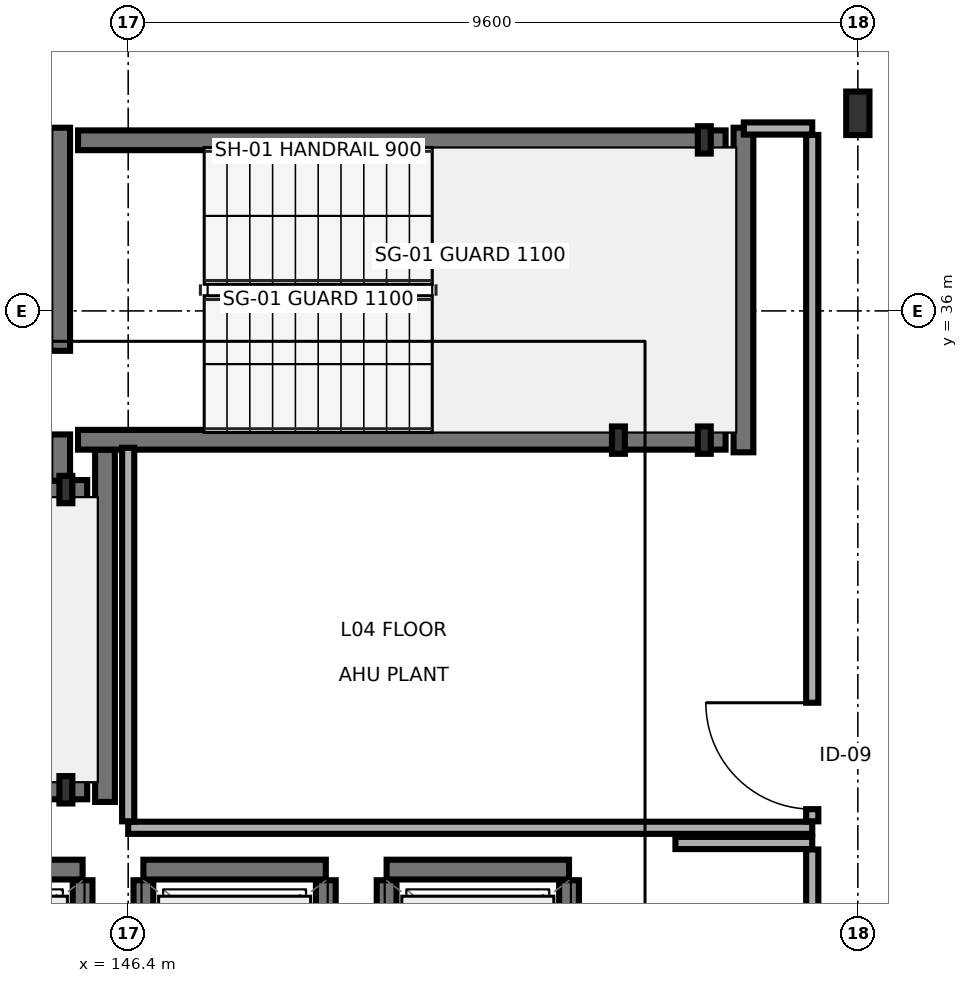
"""IFC4 building model, lengths in metres.
Left out: names, types, materials, properties, quantities, classifications, styles, units other than length and angle.
Written with IfcOpenShell. Run it as: python <this file> out.ifc"""

import sys

from ifc_helpers import new_model, si_unit, direction, frame, frame_2d, origin, origin_2d, place, context, subcontext, project, spatial, rectangle, i_section, extrude, element, fill, save


model = new_model("IFC4")
c1 = context("Model", 3, precision=1e-05, world=origin(), true_north=direction((0.0, 1.0)))
c2 = subcontext(c1, "Body", "Model", "MODEL_VIEW")
j1 = project(units=[si_unit("LENGTHUNIT", "METRE"), si_unit("PLANEANGLEUNIT", "RADIAN")], contexts=[c1])
p1 = place(None, origin())
s1 = spatial("IfcSite", under=j1, at=p1, CompositionType="ELEMENT")
p2 = place(p1, origin())
s2 = spatial("IfcBuilding", under=s1, at=p2, CompositionType="ELEMENT")
p3 = place(p2, frame((0.0, 0.0, 14.7)))
s3 = spatial("IfcBuildingStorey", under=s2, at=p3, CompositionType="ELEMENT", Elevation=14.7)
for number, where, z_axis, x_axis in (
    (1, (145.58, 29.7, 0.0), (0.0, 0.0, 1.0), (1.0, 0.0, 0.0)),
    (2, (145.58, 33.65, 0.0), (0.0, 0.0, 1.0), (1.0, 0.0, 0.0)),
    (3, (152.85, 34.3, 0.0), (0.0, 0.0, 1.0), (1.0, 0.0, 0.0)),
    (4, (153.98, 34.3, 0.0), (0.0, 0.0, 1.0), (1.0, 0.0, 0.0)),
    (5, (153.98, 38.25, 0.0), (0.0, 0.0, 1.0), (1.0, 0.0, 0.0)),
):
    element("IfcColumn", number, at=place(p3, frame(where, z_axis=z_axis, x_axis=x_axis)), inside=s3, PredefinedType="PILASTER", context=c2, shape_type="SweptSolid", body=[
        extrude(i_section(OverallWidth=0.17, OverallDepth=0.36, WebThickness=0.008, FlangeThickness=0.013, FilletRadius=0.018, at=origin_2d()), origin(), (0.0, 0.0, 1.0), 3.4),
    ])
p4 = place(p3, frame((156.0, 38.6, 0.0), z_axis=(0.0, 0.0, 1.0), x_axis=(1.0, 0.0, 0.0)))
e6 = element("IfcColumn", 6, at=p4, inside=s3, PredefinedType="COLUMN", context=c2, shape_type="SweptSolid", body=[
    extrude(i_section(OverallWidth=0.306, OverallDepth=0.572, WebThickness=0.021, FlangeThickness=0.04, FilletRadius=0.027, at=origin_2d()), origin(), (0.0, 0.0, 1.0), 3.4),
])
p5 = place(p3, frame((146.095, 29.54, 0.0), z_axis=(0.0, 0.0, 1.0), x_axis=(0.0, 1.0, 0.0)))
e7 = element("IfcWall", 7, at=p5, inside=s3, PredefinedType="SHEAR", context=c2, shape_type="SweptSolid", body=[
    extrude(rectangle(XDim=4.635, YDim=0.26, at=frame_2d((2.317, 0.0))), origin(), (0.0, 0.0, 1.0), 3.215),
])
for number, where, z_axis, x_axis in (
    (8, (137.34, 29.705, 0.0), (0.0, 0.0, 1.0), (1.0, 0.0, 0.0)),
    (9, (137.34, 33.645, 0.0), (0.0, 0.0, 1.0), (1.0, 0.0, 0.0)),
):
    element("IfcWall", number, at=place(p3, frame(where, z_axis=z_axis, x_axis=x_axis)), inside=s3, PredefinedType="SHEAR", context=c2, shape_type="SweptSolid", body=[
        extrude(rectangle(XDim=8.52, YDim=0.26, at=frame_2d((4.26, 0.0))), origin(), (0.0, 0.0, 1.0), 3.215),
    ])
p6 = place(p3, frame((145.505, 33.765, 0.0), z_axis=(0.0, 0.0, 1.0), x_axis=(0.0, 1.0, 0.0)))
e10 = element("IfcWall", 10, at=p6, inside=s3, PredefinedType="SHEAR", context=c2, shape_type="SweptSolid", body=[
    extrude(rectangle(XDim=4.645, YDim=0.26, at=frame_2d((2.323, 0.0))), origin(), (0.0, 0.0, 1.0), 3.215),
])
p7 = place(p6, frame((0.61, 0.0, 0.0)))
e11 = element("IfcOpeningElement", 11, at=p7, cuts=e10, PredefinedType="OPENING", context=c2, shape_type="SweptSolid", body=[
    extrude(rectangle(XDim=1.1, YDim=2.2, at=frame_2d((0.55, 1.1))), frame((0.0, 0.14, 0.0), z_axis=(0.0, -1.0, 0.0), x_axis=(1.0, 0.0, 0.0)), (0.0, 0.0, 1.0), 0.28),
])
p8 = place(p3, frame((154.495, 34.14, 0.0), z_axis=(0.0, 0.0, 1.0), x_axis=(0.0, 1.0, 0.0)))
e12 = element("IfcWall", 12, at=p8, inside=s3, PredefinedType="SHEAR", context=c2, shape_type="SweptSolid", body=[
    extrude(rectangle(XDim=4.27, YDim=0.26, at=frame_2d((2.135, 0.0))), origin(), (0.0, 0.0, 1.0), 3.215),
])
for number, where, z_axis, x_axis in (
    (13, (145.74, 34.305, 0.0), (0.0, 0.0, 1.0), (1.0, 0.0, 0.0)),
    (14, (145.74, 38.245, 0.0), (0.0, 0.0, 1.0), (1.0, 0.0, 0.0)),
):
    element("IfcWall", number, at=place(p3, frame(where, z_axis=z_axis, x_axis=x_axis)), inside=s3, PredefinedType="SHEAR", context=c2, shape_type="SweptSolid", body=[
        extrude(rectangle(XDim=8.52, YDim=0.26, at=frame_2d((4.26, 0.0))), origin(), (0.0, 0.0, 1.0), 3.215),
    ])
p9 = place(p3, frame((143.4, 28.65, 0.0), z_axis=(0.0, 0.0, 1.0), x_axis=(1.0, 0.0, 0.0)))
e15 = element("IfcWall", 15, at=p9, inside=s3, PredefinedType="SHEAR", context=c2, shape_type="SweptSolid", body=[
    extrude(rectangle(XDim=2.4, YDim=0.26, at=frame_2d((1.2, 0.0))), origin(), (0.0, 0.0, 1.0), 3.215),
])
p10 = place(p3, frame((145.8, 26.69, 0.0), z_axis=(0.0, 0.0, 1.0), x_axis=(0.0, 1.0, 0.0)))
e16 = element("IfcWall", 16, at=p10, inside=s3, PredefinedType="SHEAR", context=c2, shape_type="SweptSolid", body=[
    extrude(rectangle(XDim=1.82, YDim=0.26, at=frame_2d((0.91, 0.0))), origin(), (0.0, 0.0, 1.0), 3.215),
])
p11 = place(p3, frame((146.6, 28.65, 0.0), z_axis=(0.0, 0.0, 1.0), x_axis=(1.0, 0.0, 0.0)))
e17 = element("IfcWall", 17, at=p11, inside=s3, PredefinedType="SHEAR", context=c2, shape_type="SweptSolid", body=[
    extrude(rectangle(XDim=2.4, YDim=0.26, at=frame_2d((1.2, 0.0))), origin(), (0.0, 0.0, 1.0), 3.215),
])
for number, where, z_axis, x_axis in (
    (18, (146.6, 26.69, 0.0), (0.0, 0.0, 1.0), (0.0, 1.0, 0.0)),
    (19, (149.0, 26.69, 0.0), (0.0, 0.0, 1.0), (0.0, 1.0, 0.0)),
):
    element("IfcWall", number, at=place(p3, frame(where, z_axis=z_axis, x_axis=x_axis)), inside=s3, PredefinedType="SHEAR", context=c2, shape_type="SweptSolid", body=[
        extrude(rectangle(XDim=1.82, YDim=0.26, at=frame_2d((0.91, 0.0))), origin(), (0.0, 0.0, 1.0), 3.215),
    ])
p12 = place(p3, frame((149.8, 28.65, 0.0), z_axis=(0.0, 0.0, 1.0), x_axis=(1.0, 0.0, 0.0)))
e20 = element("IfcWall", 20, at=p12, inside=s3, PredefinedType="SHEAR", context=c2, shape_type="SweptSolid", body=[
    extrude(rectangle(XDim=2.4, YDim=0.26, at=frame_2d((1.2, 0.0))), origin(), (0.0, 0.0, 1.0), 3.215),
])
for number, where, z_axis, x_axis in (
    (21, (149.8, 26.69, 0.0), (0.0, 0.0, 1.0), (0.0, 1.0, 0.0)),
    (22, (152.2, 26.69, 0.0), (0.0, 0.0, 1.0), (0.0, 1.0, 0.0)),
):
    element("IfcWall", number, at=place(p3, frame(where, z_axis=z_axis, x_axis=x_axis)), inside=s3, PredefinedType="SHEAR", context=c2, shape_type="SweptSolid", body=[
        extrude(rectangle(XDim=1.82, YDim=0.26, at=frame_2d((0.91, 0.0))), origin(), (0.0, 0.0, 1.0), 3.215),
    ])
p13 = place(p3, frame((146.4, 29.2, 0.0), z_axis=(0.0, 0.0, 1.0), x_axis=(1.0, 0.0, 0.0)))
e23 = element("IfcWall", 23, at=p13, inside=s3, PredefinedType="PARTITIONING", context=c2, shape_type="SweptSolid", body=[
    extrude(rectangle(XDim=9.0, YDim=0.16, at=frame_2d((4.5, 0.0))), origin(), (0.0, 0.0, 1.0), 3.215),
])
p14 = place(p3, frame((146.4, 29.285, 0.0), z_axis=(0.0, 0.0, 1.0), x_axis=(0.0, 1.0, 0.0)))
e24 = element("IfcWall", 24, at=p14, inside=s3, PredefinedType="PARTITIONING", context=c2, shape_type="SweptSolid", body=[
    extrude(rectangle(XDim=4.915, YDim=0.16, at=frame_2d((2.458, 0.0))), origin(), (0.0, 0.0, 1.0), 3.215),
])
p15 = place(p3, frame((154.5, 38.4, 0.0), z_axis=(0.0, 0.0, 1.0), x_axis=(1.0, 0.0, 0.0)))
e25 = element("IfcWall", 25, at=p15, inside=s3, PredefinedType="PARTITIONING", context=c2, shape_type="SweptSolid", body=[
    extrude(rectangle(XDim=0.9, YDim=0.16, at=frame_2d((0.45, 0.0))), origin(), (0.0, 0.0, 1.0), 2.75),
])
p16 = place(p3, frame((155.4, 29.285, 0.0), z_axis=(0.0, 0.0, 1.0), x_axis=(0.0, 1.0, 0.0)))
e26 = element("IfcWall", 26, at=p16, inside=s3, PredefinedType="PARTITIONING", context=c2, shape_type="SweptSolid", body=[
    extrude(rectangle(XDim=9.03, YDim=0.16, at=frame_2d((4.515, 0.0))), origin(), (0.0, 0.0, 1.0), 3.215),
])
p17 = place(p16, frame((0.16, 0.0, 0.0)))
e27 = element("IfcOpeningElement", 27, at=p17, cuts=e26, PredefinedType="OPENING", context=c2, shape_type="SweptSolid", body=[
    extrude(rectangle(XDim=1.4, YDim=2.2, at=frame_2d((0.7, 1.1))), frame((0.0, 0.09, 0.0), z_axis=(0.0, -1.0, 0.0), x_axis=(1.0, 0.0, 0.0)), (0.0, 0.0, 1.0), 0.18),
])
p18 = place(p3, frame((153.6, 29.0, 0.0), z_axis=(0.0, 0.0, 1.0), x_axis=(1.0, 0.0, 0.0)))
e28 = element("IfcWall", 28, at=p18, inside=s3, PredefinedType="PARTITIONING", context=c2, shape_type="SweptSolid", body=[
    extrude(rectangle(XDim=1.8, YDim=0.16, at=frame_2d((0.9, 0.0))), origin(), (0.0, 0.0, 1.0), 3.215),
])
p19 = place(p3, frame((155.4, 16.885, 0.0), z_axis=(0.0, 0.0, 1.0), x_axis=(0.0, 1.0, 0.0)))
e29 = element("IfcWall", 29, at=p19, inside=s3, PredefinedType="PARTITIONING", context=c2, shape_type="SweptSolid", body=[
    extrude(rectangle(XDim=12.03, YDim=0.16, at=frame_2d((6.015, 0.0))), origin(), (0.0, 0.0, 1.0), 2.75),
])
p20 = place(p19, frame((5.365, 0.0, 0.0)))
e30 = element("IfcOpeningElement", 30, at=p20, cuts=e29, PredefinedType="OPENING", context=c2, shape_type="SweptSolid", body=[
    extrude(rectangle(XDim=1.3, YDim=2.2, at=frame_2d((0.65, 1.1))), frame((0.0, 0.09, 0.0), z_axis=(0.0, -1.0, 0.0), x_axis=(1.0, 0.0, 0.0)), (0.0, 0.0, 1.0), 0.18),
])
p21 = place(p7, origin())
e31 = element("IfcDoor", 31, at=p21, inside=s3, OperationType="SINGLE_SWING_LEFT", PredefinedType="DOOR", context=c2, shape_type="SweptSolid", body=[
    extrude(rectangle(XDim=1.1, YDim=2.2, at=frame_2d((0.55, 1.1))), frame((0.0, 0.025, 0.0), z_axis=(0.0, -1.0, 0.0), x_axis=(1.0, 0.0, 0.0)), (0.0, 0.0, 1.0), 0.05),
])
fill(e11, e31)
p22 = place(p17, origin())
e32 = element("IfcDoor", 32, at=p22, inside=s3, OperationType="SINGLE_SWING_RIGHT", PredefinedType="DOOR", context=c2, shape_type="SweptSolid", body=[
    extrude(rectangle(XDim=1.4, YDim=2.2, at=frame_2d((0.7, 1.1))), frame((0.0, 0.025, 0.0), z_axis=(0.0, -1.0, 0.0), x_axis=(1.0, 0.0, 0.0)), (0.0, 0.0, 1.0), 0.05),
])
fill(e27, e32)
save(model, sys.argv[1])
